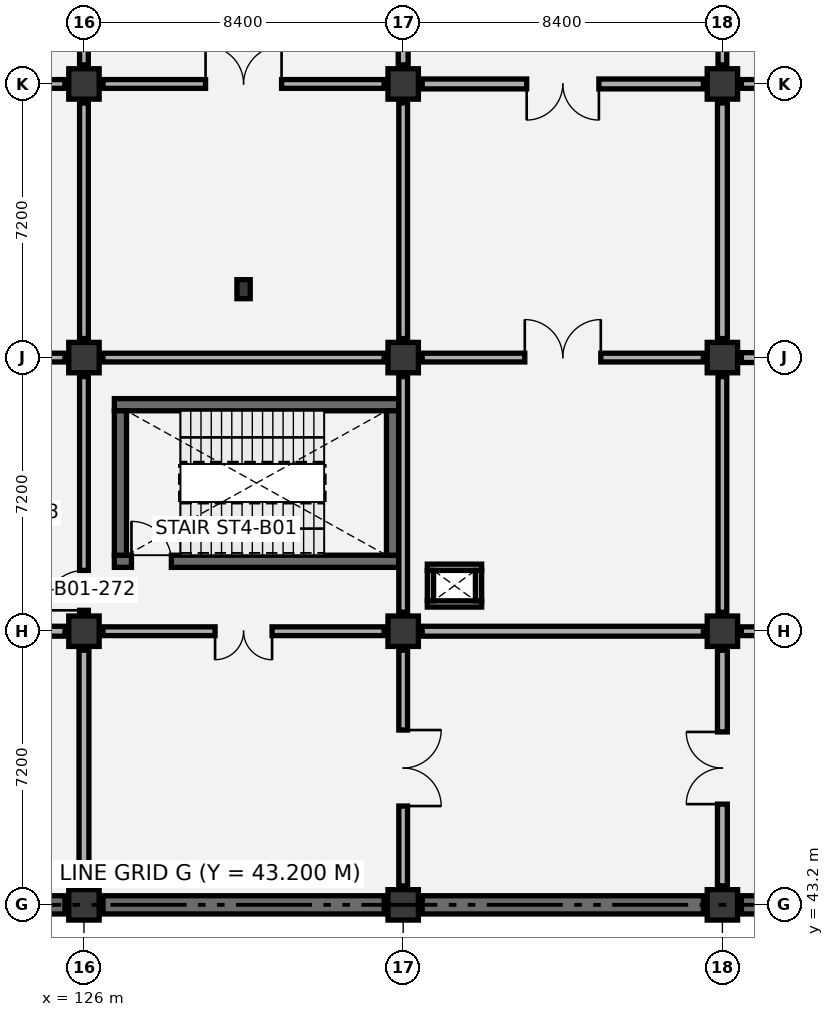
"""IFC4 building model, lengths in metres.
Left out: names, types, materials, properties, quantities, classifications, styles, units other than length and angle.
Written with IfcOpenShell. Run it as: python <this file> out.ifc"""

import sys

from ifc_helpers import new_model, si_unit, direction, frame, frame_2d, origin, origin_2d, place, context, subcontext, project, spatial, rectangle, extrude, element, fill, save


model = new_model("IFC4")
c1 = context("Model", 3, precision=1e-05, world=origin(), true_north=direction((0.0, 1.0)))
c2 = subcontext(c1, "Body", "Model", "MODEL_VIEW")
j1 = project(units=[si_unit("LENGTHUNIT", "METRE"), si_unit("PLANEANGLEUNIT", "RADIAN")], contexts=[c1])
p1 = place(None, origin())
s1 = spatial("IfcSite", under=j1, at=p1, CompositionType="ELEMENT")
p2 = place(p1, origin())
s2 = spatial("IfcBuilding", under=s1, at=p2, CompositionType="ELEMENT")
p3 = place(p2, frame((0.0, 0.0, -4.8)))
s3 = spatial("IfcBuildingStorey", under=s2, at=p3, CompositionType="ELEMENT", Elevation=-4.8)
for number, where, z_axis, x_axis in (
    (1, (126.0, 43.2, 0.0), (0.0, 0.0, 1.0), (1.0, 0.0, 0.0)),
    (2, (126.0, 50.4, 0.0), (0.0, 0.0, 1.0), (1.0, 0.0, 0.0)),
    (3, (126.0, 57.6, 0.0), (0.0, 0.0, 1.0), (1.0, 0.0, 0.0)),
    (4, (126.0, 64.8, 0.0), (0.0, 0.0, 1.0), (1.0, 0.0, 0.0)),
    (5, (134.4, 43.2, 0.0), (0.0, 0.0, 1.0), (1.0, 0.0, 0.0)),
    (6, (134.4, 50.4, 0.0), (0.0, 0.0, 1.0), (1.0, 0.0, 0.0)),
    (7, (134.4, 57.6, 0.0), (0.0, 0.0, 1.0), (1.0, 0.0, 0.0)),
    (8, (134.4, 64.8, 0.0), (0.0, 0.0, 1.0), (1.0, 0.0, 0.0)),
    (9, (142.8, 43.2, 0.0), (0.0, 0.0, 1.0), (1.0, 0.0, 0.0)),
    (10, (142.8, 50.4, 0.0), (0.0, 0.0, 1.0), (1.0, 0.0, 0.0)),
    (11, (142.8, 57.6, 0.0), (0.0, 0.0, 1.0), (1.0, 0.0, 0.0)),
    (12, (142.8, 64.8, 0.0), (0.0, 0.0, 1.0), (1.0, 0.0, 0.0)),
):
    element("IfcColumn", number, at=place(p3, frame(where, z_axis=z_axis, x_axis=x_axis)), inside=s3, PredefinedType="COLUMN", context=c2, shape_type="SweptSolid", body=[
        extrude(rectangle(XDim=0.8, YDim=0.8, at=origin_2d()), origin(), (0.0, 0.0, 1.0), 4.8),
    ])
p4 = place(p3, frame((130.2, 59.4, 0.0), z_axis=(0.0, 0.0, 1.0), x_axis=(1.0, 0.0, 0.0)))
e13 = element("IfcColumn", 13, at=p4, inside=s3, PredefinedType="PILASTER", context=c2, shape_type="SweptSolid", body=[
    extrude(rectangle(XDim=0.35, YDim=0.5, at=origin_2d()), origin(), (0.0, 0.0, 1.0), 4.8),
])
for number, where, z_axis, x_axis in (
    (14, (118.1, 43.2, 0.0), (0.0, 0.0, 1.0), (1.0, 0.0, 0.0)),
    (15, (126.5, 43.2, 0.0), (0.0, 0.0, 1.0), (1.0, 0.0, 0.0)),
):
    element("IfcWall", number, at=place(p3, frame(where, z_axis=z_axis, x_axis=x_axis)), inside=s3, PredefinedType="USERDEFINED", context=c2, shape_type="SweptSolid", body=[
        extrude(rectangle(XDim=7.4, YDim=0.48, at=frame_2d((3.7, 0.0))), origin(), (0.0, 0.0, 1.0), 4.45),
    ])
p5 = place(p3, frame((134.9, 43.2, 0.0), z_axis=(0.0, 0.0, 1.0), x_axis=(1.0, 0.0, 0.0)))
e16 = element("IfcWall", 16, at=p5, inside=s3, PredefinedType="USERDEFINED", context=c2, shape_type="SweptSolid", body=[
    extrude(rectangle(XDim=7.4, YDim=0.48, at=frame_2d((3.7, 0.0))), origin(), (0.0, 0.0, 1.0), 4.45),
])
p6 = place(p3, frame((143.3, 43.2, 0.0), z_axis=(0.0, 0.0, 1.0), x_axis=(1.0, 0.0, 0.0)))
e17 = element("IfcWall", 17, at=p6, inside=s3, PredefinedType="USERDEFINED", context=c2, shape_type="SweptSolid", body=[
    extrude(rectangle(XDim=7.4, YDim=0.48, at=frame_2d((3.7, 0.0))), origin(), (0.0, 0.0, 1.0), 4.45),
])
p7 = place(p3, frame((126.8, 52.24, 0.0), z_axis=(0.0, 0.0, 1.0), x_axis=(1.0, 0.0, 0.0)))
e18 = element("IfcWall", 18, at=p7, inside=s3, PredefinedType="SHEAR", context=c2, shape_type="SweptSolid", body=[
    extrude(rectangle(XDim=7.48, YDim=0.32, at=frame_2d((3.74, 0.0))), origin(), (0.0, 0.0, 1.0), 4.45),
])
p8 = place(p7, frame((0.45, 0.0, 0.0)))
e19 = element("IfcOpeningElement", 19, at=p8, cuts=e18, PredefinedType="OPENING", context=c2, shape_type="SweptSolid", body=[
    extrude(rectangle(XDim=1.05, YDim=2.15, at=frame_2d((0.525, 1.075))), frame((0.0, 0.17, 0.0), z_axis=(0.0, -1.0, 0.0), x_axis=(1.0, 0.0, 0.0)), (0.0, 0.0, 1.0), 0.34),
])
p9 = place(p3, frame((126.8, 56.36, 0.0), z_axis=(0.0, 0.0, 1.0), x_axis=(1.0, 0.0, 0.0)))
e20 = element("IfcWall", 20, at=p9, inside=s3, PredefinedType="SHEAR", context=c2, shape_type="SweptSolid", body=[
    extrude(rectangle(XDim=7.48, YDim=0.32, at=frame_2d((3.74, 0.0))), origin(), (0.0, 0.0, 1.0), 4.45),
])
for number, where, z_axis, x_axis in (
    (21, (126.96, 52.4, 0.0), (0.0, 0.0, 1.0), (0.0, 1.0, 0.0)),
    (22, (134.12, 52.4, 0.0), (0.0, 0.0, 1.0), (0.0, 1.0, 0.0)),
):
    element("IfcWall", number, at=place(p3, frame(where, z_axis=z_axis, x_axis=x_axis)), inside=s3, PredefinedType="SHEAR", context=c2, shape_type="SweptSolid", body=[
        extrude(rectangle(XDim=3.8, YDim=0.32, at=frame_2d((1.9, 0.0))), origin(), (0.0, 0.0, 1.0), 4.45),
    ])
for number, where, z_axis, x_axis in (
    (23, (135.035, 51.117, 0.0), (0.0, 0.0, 1.0), (1.0, 0.0, 0.0)),
    (24, (135.035, 52.083, 0.0), (0.0, 0.0, 1.0), (1.0, 0.0, 0.0)),
):
    element("IfcWall", number, at=place(p3, frame(where, z_axis=z_axis, x_axis=x_axis)), inside=s3, PredefinedType="PARTITIONING", context=c2, shape_type="SweptSolid", body=[
        extrude(rectangle(XDim=1.43, YDim=0.165, at=frame_2d((0.715, 0.0))), origin(), (0.0, 0.0, 1.0), 4.45),
    ])
for number, where, z_axis, x_axis in (
    (25, (135.117, 51.2, 0.0), (0.0, 0.0, 1.0), (0.0, 1.0, 0.0)),
    (26, (136.383, 51.2, 0.0), (0.0, 0.0, 1.0), (0.0, 1.0, 0.0)),
):
    element("IfcWall", number, at=place(p3, frame(where, z_axis=z_axis, x_axis=x_axis)), inside=s3, PredefinedType="PARTITIONING", context=c2, shape_type="SweptSolid", body=[
        extrude(rectangle(XDim=0.8, YDim=0.165, at=frame_2d((0.4, 0.0))), origin(), (0.0, 0.0, 1.0), 4.45),
    ])
p10 = place(p3, frame((126.0, 43.7, 0.0), z_axis=(0.0, 0.0, 1.0), x_axis=(0.0, 1.0, 0.0)))
e27 = element("IfcWall", 27, at=p10, inside=s3, PredefinedType="PARTITIONING", context=c2, shape_type="SweptSolid", body=[
    extrude(rectangle(XDim=6.2, YDim=0.26, at=frame_2d((3.1, 0.0))), origin(), (0.0, 0.0, 1.0), 3.645),
])
p11 = place(p3, frame((118.1, 50.4, 0.0), z_axis=(0.0, 0.0, 1.0), x_axis=(1.0, 0.0, 0.0)))
e28 = element("IfcWall", 28, at=p11, inside=s3, PredefinedType="PARTITIONING", context=c2, shape_type="SweptSolid", body=[
    extrude(rectangle(XDim=7.4, YDim=0.26, at=frame_2d((3.7, 0.0))), origin(), (0.0, 0.0, 1.0), 3.545),
])
p12 = place(p11, frame((2.7, 0.0, 0.0)))
e29 = element("IfcOpeningElement", 29, at=p12, cuts=e28, PredefinedType="OPENING", context=c2, shape_type="SweptSolid", body=[
    extrude(rectangle(XDim=2.0, YDim=2.35, at=frame_2d((1.0, 1.175))), frame((0.0, 0.14, 0.0), z_axis=(0.0, -1.0, 0.0), x_axis=(1.0, 0.0, 0.0)), (0.0, 0.0, 1.0), 0.28),
])
p13 = place(p3, frame((126.0, 50.9, 0.0), z_axis=(0.0, 0.0, 1.0), x_axis=(0.0, 1.0, 0.0)))
e30 = element("IfcWall", 30, at=p13, inside=s3, PredefinedType="PARTITIONING", context=c2, shape_type="SweptSolid", body=[
    extrude(rectangle(XDim=6.2, YDim=0.23, at=frame_2d((3.1, 0.0))), origin(), (0.0, 0.0, 1.0), 3.645),
])
p14 = place(p13, frame((0.05, 0.0, 0.0)))
e31 = element("IfcOpeningElement", 31, at=p14, cuts=e30, PredefinedType="OPENING", context=c2, shape_type="SweptSolid", body=[
    extrude(rectangle(XDim=1.05, YDim=2.15, at=frame_2d((0.525, 1.075))), frame((0.0, 0.125, 0.0), z_axis=(0.0, -1.0, 0.0), x_axis=(1.0, 0.0, 0.0)), (0.0, 0.0, 1.0), 0.25),
])
p15 = place(p3, frame((118.1, 57.6, 0.0), z_axis=(0.0, 0.0, 1.0), x_axis=(1.0, 0.0, 0.0)))
e32 = element("IfcWall", 32, at=p15, inside=s3, PredefinedType="PARTITIONING", context=c2, shape_type="SweptSolid", body=[
    extrude(rectangle(XDim=7.4, YDim=0.23, at=frame_2d((3.7, 0.0))), origin(), (0.0, 0.0, 1.0), 3.545),
])
p16 = place(p15, frame((2.95, 0.0, 0.0)))
e33 = element("IfcOpeningElement", 33, at=p16, cuts=e32, PredefinedType="OPENING", context=c2, shape_type="SweptSolid", body=[
    extrude(rectangle(XDim=1.5, YDim=2.15, at=frame_2d((0.75, 1.075))), frame((0.0, 0.125, 0.0), z_axis=(0.0, -1.0, 0.0), x_axis=(1.0, 0.0, 0.0)), (0.0, 0.0, 1.0), 0.25),
])
p17 = place(p3, frame((126.0, 58.1, 0.0), z_axis=(0.0, 0.0, 1.0), x_axis=(0.0, 1.0, 0.0)))
e34 = element("IfcWall", 34, at=p17, inside=s3, PredefinedType="PARTITIONING", context=c2, shape_type="SweptSolid", body=[
    extrude(rectangle(XDim=6.2, YDim=0.23, at=frame_2d((3.1, 0.0))), origin(), (0.0, 0.0, 1.0), 3.645),
])
p18 = place(p3, frame((118.1, 64.8, 0.0), z_axis=(0.0, 0.0, 1.0), x_axis=(1.0, 0.0, 0.0)))
e35 = element("IfcWall", 35, at=p18, inside=s3, PredefinedType="PARTITIONING", context=c2, shape_type="SweptSolid", body=[
    extrude(rectangle(XDim=7.4, YDim=0.23, at=frame_2d((3.7, 0.0))), origin(), (0.0, 0.0, 1.0), 3.545),
])
p19 = place(p3, frame((126.0, 65.3, 0.0), z_axis=(0.0, 0.0, 1.0), x_axis=(0.0, 1.0, 0.0)))
e36 = element("IfcWall", 36, at=p19, inside=s3, PredefinedType="PARTITIONING", context=c2, shape_type="SweptSolid", body=[
    extrude(rectangle(XDim=6.2, YDim=0.23, at=frame_2d((3.1, 0.0))), origin(), (0.0, 0.0, 1.0), 3.645),
])
p20 = place(p3, frame((134.4, 43.7, 0.0), z_axis=(0.0, 0.0, 1.0), x_axis=(0.0, 1.0, 0.0)))
e37 = element("IfcWall", 37, at=p20, inside=s3, PredefinedType="PARTITIONING", context=c2, shape_type="SweptSolid", body=[
    extrude(rectangle(XDim=6.2, YDim=0.23, at=frame_2d((3.1, 0.0))), origin(), (0.0, 0.0, 1.0), 3.645),
])
p21 = place(p20, frame((2.1, 0.0, 0.0)))
e38 = element("IfcOpeningElement", 38, at=p21, cuts=e37, PredefinedType="OPENING", context=c2, shape_type="SweptSolid", body=[
    extrude(rectangle(XDim=2.0, YDim=2.35, at=frame_2d((1.0, 1.175))), frame((0.0, 0.125, 0.0), z_axis=(0.0, -1.0, 0.0), x_axis=(1.0, 0.0, 0.0)), (0.0, 0.0, 1.0), 0.25),
])
p22 = place(p3, frame((126.5, 50.4, 0.0), z_axis=(0.0, 0.0, 1.0), x_axis=(1.0, 0.0, 0.0)))
e39 = element("IfcWall", 39, at=p22, inside=s3, PredefinedType="PARTITIONING", context=c2, shape_type="SweptSolid", body=[
    extrude(rectangle(XDim=7.4, YDim=0.23, at=frame_2d((3.7, 0.0))), origin(), (0.0, 0.0, 1.0), 3.545),
])
p23 = place(p22, frame((2.95, 0.0, 0.0)))
e40 = element("IfcOpeningElement", 40, at=p23, cuts=e39, PredefinedType="OPENING", context=c2, shape_type="SweptSolid", body=[
    extrude(rectangle(XDim=1.5, YDim=2.15, at=frame_2d((0.75, 1.075))), frame((0.0, 0.125, 0.0), z_axis=(0.0, -1.0, 0.0), x_axis=(1.0, 0.0, 0.0)), (0.0, 0.0, 1.0), 0.25),
])
p24 = place(p3, frame((134.4, 50.9, 0.0), z_axis=(0.0, 0.0, 1.0), x_axis=(0.0, 1.0, 0.0)))
e41 = element("IfcWall", 41, at=p24, inside=s3, PredefinedType="PARTITIONING", context=c2, shape_type="SweptSolid", body=[
    extrude(rectangle(XDim=6.2, YDim=0.23, at=frame_2d((3.1, 0.0))), origin(), (0.0, 0.0, 1.0), 3.645),
])
p25 = place(p3, frame((126.5, 57.6, 0.0), z_axis=(0.0, 0.0, 1.0), x_axis=(1.0, 0.0, 0.0)))
e42 = element("IfcWall", 42, at=p25, inside=s3, PredefinedType="PARTITIONING", context=c2, shape_type="SweptSolid", body=[
    extrude(rectangle(XDim=7.4, YDim=0.23, at=frame_2d((3.7, 0.0))), origin(), (0.0, 0.0, 1.0), 3.545),
])
p26 = place(p3, frame((134.4, 58.1, 0.0), z_axis=(0.0, 0.0, 1.0), x_axis=(0.0, 1.0, 0.0)))
e43 = element("IfcWall", 43, at=p26, inside=s3, PredefinedType="PARTITIONING", context=c2, shape_type="SweptSolid", body=[
    extrude(rectangle(XDim=6.2, YDim=0.23, at=frame_2d((3.1, 0.0))), origin(), (0.0, 0.0, 1.0), 3.645),
])
p27 = place(p3, frame((126.5, 64.8, 0.0), z_axis=(0.0, 0.0, 1.0), x_axis=(1.0, 0.0, 0.0)))
e44 = element("IfcWall", 44, at=p27, inside=s3, PredefinedType="PARTITIONING", context=c2, shape_type="SweptSolid", body=[
    extrude(rectangle(XDim=7.4, YDim=0.23, at=frame_2d((3.7, 0.0))), origin(), (0.0, 0.0, 1.0), 3.545),
])
p28 = place(p27, frame((2.7, 0.0, 0.0)))
e45 = element("IfcOpeningElement", 45, at=p28, cuts=e44, PredefinedType="OPENING", context=c2, shape_type="SweptSolid", body=[
    extrude(rectangle(XDim=2.0, YDim=2.35, at=frame_2d((1.0, 1.175))), frame((0.0, 0.125, 0.0), z_axis=(0.0, -1.0, 0.0), x_axis=(1.0, 0.0, 0.0)), (0.0, 0.0, 1.0), 0.25),
])
p29 = place(p3, frame((134.4, 65.3, 0.0), z_axis=(0.0, 0.0, 1.0), x_axis=(0.0, 1.0, 0.0)))
e46 = element("IfcWall", 46, at=p29, inside=s3, PredefinedType="PARTITIONING", context=c2, shape_type="SweptSolid", body=[
    extrude(rectangle(XDim=6.2, YDim=0.26, at=frame_2d((3.1, 0.0))), origin(), (0.0, 0.0, 1.0), 3.645),
])
p30 = place(p3, frame((142.8, 43.7, 0.0), z_axis=(0.0, 0.0, 1.0), x_axis=(0.0, 1.0, 0.0)))
e47 = element("IfcWall", 47, at=p30, inside=s3, PredefinedType="PARTITIONING", context=c2, shape_type="SweptSolid", body=[
    extrude(rectangle(XDim=6.2, YDim=0.26, at=frame_2d((3.1, 0.0))), origin(), (0.0, 0.0, 1.0), 3.645),
])
p31 = place(p30, frame((2.15, 0.0, 0.0)))
e48 = element("IfcOpeningElement", 48, at=p31, cuts=e47, PredefinedType="OPENING", context=c2, shape_type="SweptSolid", body=[
    extrude(rectangle(XDim=1.9, YDim=2.3, at=frame_2d((0.95, 1.15))), frame((0.0, 0.14, 0.0), z_axis=(0.0, -1.0, 0.0), x_axis=(1.0, 0.0, 0.0)), (0.0, 0.0, 1.0), 0.28),
])
p32 = place(p3, frame((134.9, 50.4, 0.0), z_axis=(0.0, 0.0, 1.0), x_axis=(1.0, 0.0, 0.0)))
e49 = element("IfcWall", 49, at=p32, inside=s3, PredefinedType="PARTITIONING", context=c2, shape_type="SweptSolid", body=[
    extrude(rectangle(XDim=7.4, YDim=0.26, at=frame_2d((3.7, 0.0))), origin(), (0.0, 0.0, 1.0), 3.545),
])
p33 = place(p3, frame((142.8, 50.9, 0.0), z_axis=(0.0, 0.0, 1.0), x_axis=(0.0, 1.0, 0.0)))
e50 = element("IfcWall", 50, at=p33, inside=s3, PredefinedType="PARTITIONING", context=c2, shape_type="SweptSolid", body=[
    extrude(rectangle(XDim=6.2, YDim=0.23, at=frame_2d((3.1, 0.0))), origin(), (0.0, 0.0, 1.0), 3.645),
])
p34 = place(p3, frame((134.9, 57.6, 0.0), z_axis=(0.0, 0.0, 1.0), x_axis=(1.0, 0.0, 0.0)))
e51 = element("IfcWall", 51, at=p34, inside=s3, PredefinedType="PARTITIONING", context=c2, shape_type="SweptSolid", body=[
    extrude(rectangle(XDim=7.4, YDim=0.23, at=frame_2d((3.7, 0.0))), origin(), (0.0, 0.0, 1.0), 3.545),
])
p35 = place(p34, frame((2.7, 0.0, 0.0)))
e52 = element("IfcOpeningElement", 52, at=p35, cuts=e51, PredefinedType="OPENING", context=c2, shape_type="SweptSolid", body=[
    extrude(rectangle(XDim=2.0, YDim=2.35, at=frame_2d((1.0, 1.175))), frame((0.0, 0.125, 0.0), z_axis=(0.0, -1.0, 0.0), x_axis=(1.0, 0.0, 0.0)), (0.0, 0.0, 1.0), 0.25),
])
p36 = place(p3, frame((142.8, 58.1, 0.0), z_axis=(0.0, 0.0, 1.0), x_axis=(0.0, 1.0, 0.0)))
e53 = element("IfcWall", 53, at=p36, inside=s3, PredefinedType="PARTITIONING", context=c2, shape_type="SweptSolid", body=[
    extrude(rectangle(XDim=6.2, YDim=0.26, at=frame_2d((3.1, 0.0))), origin(), (0.0, 0.0, 1.0), 3.645),
])
p37 = place(p3, frame((134.9, 64.8, 0.0), z_axis=(0.0, 0.0, 1.0), x_axis=(1.0, 0.0, 0.0)))
e54 = element("IfcWall", 54, at=p37, inside=s3, PredefinedType="PARTITIONING", context=c2, shape_type="SweptSolid", body=[
    extrude(rectangle(XDim=7.4, YDim=0.26, at=frame_2d((3.7, 0.0))), origin(), (0.0, 0.0, 1.0), 3.545),
])
p38 = place(p37, frame((2.75, 0.0, 0.0)))
e55 = element("IfcOpeningElement", 55, at=p38, cuts=e54, PredefinedType="OPENING", context=c2, shape_type="SweptSolid", body=[
    extrude(rectangle(XDim=1.9, YDim=2.3, at=frame_2d((0.95, 1.15))), frame((0.0, 0.14, 0.0), z_axis=(0.0, -1.0, 0.0), x_axis=(1.0, 0.0, 0.0)), (0.0, 0.0, 1.0), 0.28),
])
p39 = place(p3, frame((142.8, 65.3, 0.0), z_axis=(0.0, 0.0, 1.0), x_axis=(0.0, 1.0, 0.0)))
e56 = element("IfcWall", 56, at=p39, inside=s3, PredefinedType="PARTITIONING", context=c2, shape_type="SweptSolid", body=[
    extrude(rectangle(XDim=6.2, YDim=0.23, at=frame_2d((3.1, 0.0))), origin(), (0.0, 0.0, 1.0), 3.645),
])
p40 = place(p39, frame((2.1, 0.0, 0.0)))
e57 = element("IfcOpeningElement", 57, at=p40, cuts=e56, PredefinedType="OPENING", context=c2, shape_type="SweptSolid", body=[
    extrude(rectangle(XDim=2.0, YDim=2.35, at=frame_2d((1.0, 1.175))), frame((0.0, 0.125, 0.0), z_axis=(0.0, -1.0, 0.0), x_axis=(1.0, 0.0, 0.0)), (0.0, 0.0, 1.0), 0.25),
])
p41 = place(p3, frame((143.3, 50.4, 0.0), z_axis=(0.0, 0.0, 1.0), x_axis=(1.0, 0.0, 0.0)))
e58 = element("IfcWall", 58, at=p41, inside=s3, PredefinedType="PARTITIONING", context=c2, shape_type="SweptSolid", body=[
    extrude(rectangle(XDim=7.4, YDim=0.23, at=frame_2d((3.7, 0.0))), origin(), (0.0, 0.0, 1.0), 3.545),
])
p42 = place(p3, frame((143.3, 57.6, 0.0), z_axis=(0.0, 0.0, 1.0), x_axis=(1.0, 0.0, 0.0)))
e59 = element("IfcWall", 59, at=p42, inside=s3, PredefinedType="PARTITIONING", context=c2, shape_type="SweptSolid", body=[
    extrude(rectangle(XDim=7.4, YDim=0.26, at=frame_2d((3.7, 0.0))), origin(), (0.0, 0.0, 1.0), 3.545),
])
p43 = place(p42, frame((2.7, 0.0, 0.0)))
e60 = element("IfcOpeningElement", 60, at=p43, cuts=e59, PredefinedType="OPENING", context=c2, shape_type="SweptSolid", body=[
    extrude(rectangle(XDim=2.0, YDim=2.35, at=frame_2d((1.0, 1.175))), frame((0.0, 0.14, 0.0), z_axis=(0.0, -1.0, 0.0), x_axis=(1.0, 0.0, 0.0)), (0.0, 0.0, 1.0), 0.28),
])
p44 = place(p3, frame((143.3, 64.8, 0.0), z_axis=(0.0, 0.0, 1.0), x_axis=(1.0, 0.0, 0.0)))
e61 = element("IfcWall", 61, at=p44, inside=s3, PredefinedType="PARTITIONING", context=c2, shape_type="SweptSolid", body=[
    extrude(rectangle(XDim=7.4, YDim=0.23, at=frame_2d((3.7, 0.0))), origin(), (0.0, 0.0, 1.0), 3.545),
])
p45 = place(p44, frame((2.75, 0.0, 0.0)))
e62 = element("IfcOpeningElement", 62, at=p45, cuts=e61, PredefinedType="OPENING", context=c2, shape_type="SweptSolid", body=[
    extrude(rectangle(XDim=1.9, YDim=2.3, at=frame_2d((0.95, 1.15))), frame((0.0, 0.125, 0.0), z_axis=(0.0, -1.0, 0.0), x_axis=(1.0, 0.0, 0.0)), (0.0, 0.0, 1.0), 0.25),
])
p46 = place(p8, origin())
e63 = element("IfcDoor", 63, at=p46, inside=s3, OperationType="SINGLE_SWING_LEFT", PredefinedType="DOOR", context=c2, shape_type="SweptSolid", body=[
    extrude(rectangle(XDim=1.05, YDim=2.15, at=frame_2d((0.525, 1.075))), frame((0.0, 0.025, 0.0), z_axis=(0.0, -1.0, 0.0), x_axis=(1.0, 0.0, 0.0)), (0.0, 0.0, 1.0), 0.05),
])
fill(e19, e63)
p47 = place(p14, origin())
e64 = element("IfcDoor", 64, at=p47, inside=s3, OperationType="SINGLE_SWING_LEFT", PredefinedType="DOOR", context=c2, shape_type="SweptSolid", body=[
    extrude(rectangle(XDim=1.05, YDim=2.15, at=frame_2d((0.525, 1.075))), frame((0.0, 0.025, 0.0), z_axis=(0.0, -1.0, 0.0), x_axis=(1.0, 0.0, 0.0)), (0.0, 0.0, 1.0), 0.05),
])
fill(e31, e64)
p48 = place(p21, frame((2.0, 0.0, 0.0), z_axis=(0.0, 0.0, 1.0), x_axis=(-1.0, 0.0, 0.0)))
e65 = element("IfcDoor", 65, at=p48, inside=s3, OperationType="DOUBLE_DOOR_SINGLE_SWING", PredefinedType="DOOR", context=c2, shape_type="SweptSolid", body=[
    extrude(rectangle(XDim=2.0, YDim=2.35, at=frame_2d((1.0, 1.175))), frame((0.0, 0.025, 0.0), z_axis=(0.0, -1.0, 0.0), x_axis=(1.0, 0.0, 0.0)), (0.0, 0.0, 1.0), 0.05),
])
fill(e38, e65)
p49 = place(p23, frame((1.5, 0.0, 0.0), z_axis=(0.0, 0.0, 1.0), x_axis=(-1.0, 0.0, 0.0)))
e66 = element("IfcDoor", 66, at=p49, inside=s3, OperationType="DOUBLE_DOOR_SINGLE_SWING", PredefinedType="DOOR", context=c2, shape_type="SweptSolid", body=[
    extrude(rectangle(XDim=1.5, YDim=2.15, at=frame_2d((0.75, 1.075))), frame((0.0, 0.025, 0.0), z_axis=(0.0, -1.0, 0.0), x_axis=(1.0, 0.0, 0.0)), (0.0, 0.0, 1.0), 0.05),
])
fill(e40, e66)
p50 = place(p28, origin())
e67 = element("IfcDoor", 67, at=p50, inside=s3, OperationType="DOUBLE_DOOR_SINGLE_SWING", PredefinedType="DOOR", context=c2, shape_type="SweptSolid", body=[
    extrude(rectangle(XDim=2.0, YDim=2.35, at=frame_2d((1.0, 1.175))), frame((0.0, 0.025, 0.0), z_axis=(0.0, -1.0, 0.0), x_axis=(1.0, 0.0, 0.0)), (0.0, 0.0, 1.0), 0.05),
])
fill(e45, e67)
p51 = place(p31, origin())
e68 = element("IfcDoor", 68, at=p51, inside=s3, OperationType="DOUBLE_DOOR_SINGLE_SWING", PredefinedType="DOOR", context=c2, shape_type="SweptSolid", body=[
    extrude(rectangle(XDim=1.9, YDim=2.3, at=frame_2d((0.95, 1.15))), frame((0.0, 0.025, 0.0), z_axis=(0.0, -1.0, 0.0), x_axis=(1.0, 0.0, 0.0)), (0.0, 0.0, 1.0), 0.05),
])
fill(e48, e68)
p52 = place(p35, origin())
e69 = element("IfcDoor", 69, at=p52, inside=s3, OperationType="DOUBLE_DOOR_SINGLE_SWING", PredefinedType="DOOR", context=c2, shape_type="SweptSolid", body=[
    extrude(rectangle(XDim=2.0, YDim=2.35, at=frame_2d((1.0, 1.175))), frame((0.0, 0.025, 0.0), z_axis=(0.0, -1.0, 0.0), x_axis=(1.0, 0.0, 0.0)), (0.0, 0.0, 1.0), 0.05),
])
fill(e52, e69)
p53 = place(p38, frame((1.9, 0.0, 0.0), z_axis=(0.0, 0.0, 1.0), x_axis=(-1.0, 0.0, 0.0)))
e70 = element("IfcDoor", 70, at=p53, inside=s3, OperationType="DOUBLE_DOOR_SINGLE_SWING", PredefinedType="DOOR", context=c2, shape_type="SweptSolid", body=[
    extrude(rectangle(XDim=1.9, YDim=2.3, at=frame_2d((0.95, 1.15))), frame((0.0, 0.025, 0.0), z_axis=(0.0, -1.0, 0.0), x_axis=(1.0, 0.0, 0.0)), (0.0, 0.0, 1.0), 0.05),
])
fill(e55, e70)
save(model, sys.argv[1])
